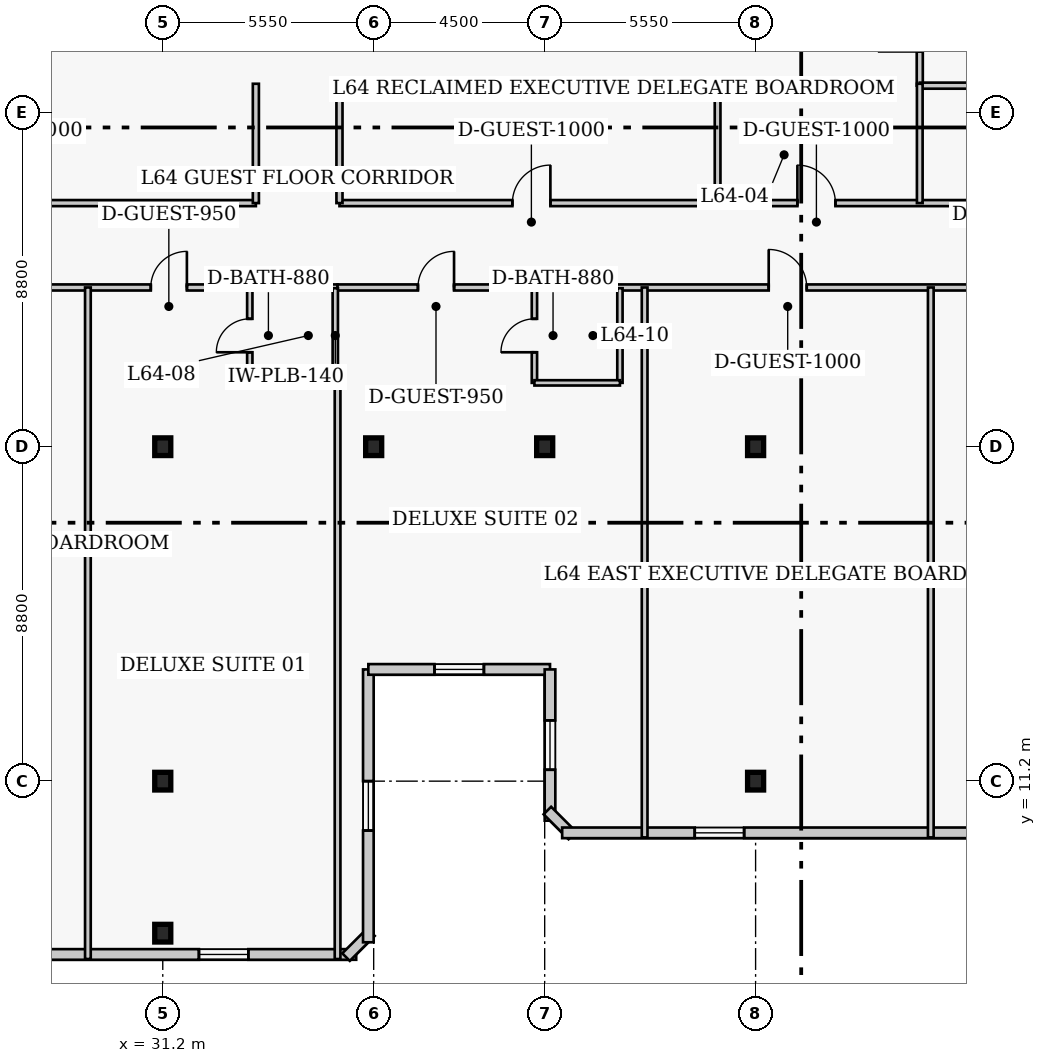
"""IFC4 building model, lengths in metres.
Left out: names, types, materials, properties, quantities, classifications, styles, units other than length and angle.
Written with IfcOpenShell. Run it as: python <this file> out.ifc"""

import sys

from ifc_helpers import new_model, si_unit, direction, frame, frame_2d, origin, origin_2d, place, context, subcontext, project, spatial, rectangle, i_section, extrude, element, fill, save


model = new_model("IFC4")
c1 = context("Model", 3, precision=1e-05, world=origin(), true_north=direction((0.0, 1.0)))
c2 = subcontext(c1, "Body", "Model", "MODEL_VIEW")
j1 = project(units=[si_unit("LENGTHUNIT", "METRE"), si_unit("PLANEANGLEUNIT", "RADIAN")], contexts=[c1])
p1 = place(None, origin())
s1 = spatial("IfcSite", under=j1, at=p1, CompositionType="ELEMENT")
p2 = place(p1, origin())
s2 = spatial("IfcBuilding", under=s1, at=p2, CompositionType="ELEMENT")
p3 = place(p2, frame((0.0, 0.0, 257.4)))
s3 = spatial("IfcBuildingStorey", under=s2, at=p3, CompositionType="ELEMENT", Elevation=257.4)
for number, where, z_axis, x_axis in (
    (1, (31.2, 11.2, 0.0), (0.0, 0.0, 1.0), (1.0, 0.0, 0.0)),
    (2, (31.2, 20.0, 0.0), (0.0, 0.0, 1.0), (1.0, 0.0, 0.0)),
    (3, (36.75, 20.0, 0.0), (0.0, 0.0, 1.0), (1.0, 0.0, 0.0)),
    (4, (41.25, 20.0, 0.0), (0.0, 0.0, 1.0), (1.0, 0.0, 0.0)),
    (5, (46.8, 11.2, 0.0), (0.0, 0.0, 1.0), (1.0, 0.0, 0.0)),
    (6, (46.8, 20.0, 0.0), (0.0, 0.0, 1.0), (1.0, 0.0, 0.0)),
    (7, (31.2, 7.2, 0.0), (0.0, 0.0, 1.0), (1.0, 0.0, 0.0)),
):
    element("IfcColumn", number, at=place(p3, frame(where, z_axis=z_axis, x_axis=x_axis)), inside=s3, PredefinedType="COLUMN", context=c2, shape_type="SweptSolid", body=[
        extrude(i_section(OverallWidth=0.422, OverallDepth=0.465, WebThickness=0.045, FlangeThickness=0.073, FilletRadius=0.017, at=origin_2d()), origin(), (0.0, 0.0, 1.0), 4.0),
    ])
p4 = place(p3, frame((11.46, 6.64, 0.0), z_axis=(0.0, 0.0, 1.0), x_axis=(1.0, 0.0, 0.0)))
e8 = element("IfcWall", 8, at=p4, inside=s3, PredefinedType="SOLIDWALL", context=c2, shape_type="SweptSolid", body=[
    extrude(rectangle(XDim=24.83, YDim=0.28, at=frame_2d((12.415, 0.0))), origin(), (0.0, 0.0, 1.0), 3.76),
])
p5 = place(p4, frame((3.488, 0.0, 0.85)))
e9 = element("IfcOpeningElement", 9, at=p5, cuts=e8, PredefinedType="OPENING", context=c2, shape_type="SweptSolid", body=[
    extrude(rectangle(XDim=1.3, YDim=1.7, at=frame_2d((0.65, 0.85))), frame((0.0, 0.15, 0.0), z_axis=(0.0, -1.0, 0.0), x_axis=(1.0, 0.0, 0.0)), (0.0, 0.0, 1.0), 0.3),
])
p6 = place(p4, frame((12.915, 0.0, 0.85)))
e10 = element("IfcOpeningElement", 10, at=p6, cuts=e8, PredefinedType="OPENING", context=c2, shape_type="SweptSolid", body=[
    extrude(rectangle(XDim=1.3, YDim=1.7, at=frame_2d((0.65, 0.85))), frame((0.0, 0.15, 0.0), z_axis=(0.0, -1.0, 0.0), x_axis=(1.0, 0.0, 0.0)), (0.0, 0.0, 1.0), 0.3),
])
p7 = place(p4, frame((20.692, 0.0, 0.85)))
e11 = element("IfcOpeningElement", 11, at=p7, cuts=e8, PredefinedType="OPENING", context=c2, shape_type="SweptSolid", body=[
    extrude(rectangle(XDim=1.3, YDim=1.7, at=frame_2d((0.65, 0.85))), frame((0.0, 0.15, 0.0), z_axis=(0.0, -1.0, 0.0), x_axis=(1.0, 0.0, 0.0)), (0.0, 0.0, 1.0), 0.3),
])
p8 = place(p3, frame((36.023, 6.571, 0.0), z_axis=(0.0, 0.0, 1.0), x_axis=(0.707106781187, 0.707106781187, 0.0)))
e12 = element("IfcWall", 12, at=p8, inside=s3, PredefinedType="SOLIDWALL", context=c2, shape_type="SweptSolid", body=[
    extrude(rectangle(XDim=0.928, YDim=0.28, at=frame_2d((0.464, 0.0))), origin(), (0.0, 0.0, 1.0), 3.76),
])
p9 = place(p3, frame((36.61, 6.96, 0.0), z_axis=(0.0, 0.0, 1.0), x_axis=(0.0, 1.0, 0.0)))
e13 = element("IfcWall", 13, at=p9, inside=s3, PredefinedType="SOLIDWALL", context=c2, shape_type="SweptSolid", body=[
    extrude(rectangle(XDim=7.18, YDim=0.28, at=frame_2d((3.59, 0.0))), origin(), (0.0, 0.0, 1.0), 3.76),
])
p10 = place(p9, frame((2.94, 0.0, 0.85)))
e14 = element("IfcOpeningElement", 14, at=p10, cuts=e13, PredefinedType="OPENING", context=c2, shape_type="SweptSolid", body=[
    extrude(rectangle(XDim=1.3, YDim=1.7, at=frame_2d((0.65, 0.85))), frame((0.0, 0.15, 0.0), z_axis=(0.0, -1.0, 0.0), x_axis=(1.0, 0.0, 0.0)), (0.0, 0.0, 1.0), 0.3),
])
p11 = place(p3, frame((36.61, 14.14, 0.0), z_axis=(0.0, 0.0, 1.0), x_axis=(1.0, 0.0, 0.0)))
e15 = element("IfcWall", 15, at=p11, inside=s3, PredefinedType="SOLIDWALL", context=c2, shape_type="SweptSolid", body=[
    extrude(rectangle(XDim=4.78, YDim=0.28, at=frame_2d((2.39, 0.0))), origin(), (0.0, 0.0, 1.0), 3.76),
])
p12 = place(p11, frame((1.74, 0.0, 0.85)))
e16 = element("IfcOpeningElement", 16, at=p12, cuts=e15, PredefinedType="OPENING", context=c2, shape_type="SweptSolid", body=[
    extrude(rectangle(XDim=1.3, YDim=1.7, at=frame_2d((0.65, 0.85))), frame((0.0, 0.15, 0.0), z_axis=(0.0, -1.0, 0.0), x_axis=(1.0, 0.0, 0.0)), (0.0, 0.0, 1.0), 0.3),
])
p13 = place(p3, frame((41.39, 14.14, 0.0), z_axis=(0.0, 0.0, 1.0), x_axis=(0.0, -1.0, 0.0)))
e17 = element("IfcWall", 17, at=p13, inside=s3, PredefinedType="SOLIDWALL", context=c2, shape_type="SweptSolid", body=[
    extrude(rectangle(XDim=3.98, YDim=0.28, at=frame_2d((1.99, 0.0))), origin(), (0.0, 0.0, 1.0), 3.76),
])
p14 = place(p13, frame((1.34, 0.0, 0.85)))
e18 = element("IfcOpeningElement", 18, at=p14, cuts=e17, PredefinedType="OPENING", context=c2, shape_type="SweptSolid", body=[
    extrude(rectangle(XDim=1.3, YDim=1.7, at=frame_2d((0.65, 0.85))), frame((0.0, 0.15, 0.0), z_axis=(0.0, -1.0, 0.0), x_axis=(1.0, 0.0, 0.0)), (0.0, 0.0, 1.0), 0.3),
])
p15 = place(p3, frame((41.321, 10.427, 0.0), z_axis=(0.0, 0.0, 1.0), x_axis=(0.707106781187, -0.707106781187, 0.0)))
e19 = element("IfcWall", 19, at=p15, inside=s3, PredefinedType="SOLIDWALL", context=c2, shape_type="SweptSolid", body=[
    extrude(rectangle(XDim=0.928, YDim=0.28, at=frame_2d((0.464, 0.0))), origin(), (0.0, 0.0, 1.0), 3.76),
])
p16 = place(p3, frame((41.71, 9.84, 0.0), z_axis=(0.0, 0.0, 1.0), x_axis=(1.0, 0.0, 0.0)))
e20 = element("IfcWall", 20, at=p16, inside=s3, PredefinedType="SOLIDWALL", context=c2, shape_type="SweptSolid", body=[
    extrude(rectangle(XDim=24.83, YDim=0.28, at=frame_2d((12.415, 0.0))), origin(), (0.0, 0.0, 1.0), 3.76),
])
p17 = place(p16, frame((3.488, 0.0, 0.85)))
e21 = element("IfcOpeningElement", 21, at=p17, cuts=e20, PredefinedType="OPENING", context=c2, shape_type="SweptSolid", body=[
    extrude(rectangle(XDim=1.3, YDim=1.7, at=frame_2d((0.65, 0.85))), frame((0.0, 0.15, 0.0), z_axis=(0.0, -1.0, 0.0), x_axis=(1.0, 0.0, 0.0)), (0.0, 0.0, 1.0), 0.3),
])
p18 = place(p16, frame((11.115, 0.0, 0.85)))
e22 = element("IfcOpeningElement", 22, at=p18, cuts=e20, PredefinedType="OPENING", context=c2, shape_type="SweptSolid", body=[
    extrude(rectangle(XDim=1.3, YDim=1.7, at=frame_2d((0.65, 0.85))), frame((0.0, 0.15, 0.0), z_axis=(0.0, -1.0, 0.0), x_axis=(1.0, 0.0, 0.0)), (0.0, 0.0, 1.0), 0.3),
])
p19 = place(p16, frame((18.892, 0.0, 0.85)))
e23 = element("IfcOpeningElement", 23, at=p19, cuts=e20, PredefinedType="OPENING", context=c2, shape_type="SweptSolid", body=[
    extrude(rectangle(XDim=1.3, YDim=1.7, at=frame_2d((0.65, 0.85))), frame((0.0, 0.15, 0.0), z_axis=(0.0, -1.0, 0.0), x_axis=(1.0, 0.0, 0.0)), (0.0, 0.0, 1.0), 0.3),
])
p20 = place(p3, frame((51.12, 29.5, 0.0), z_axis=(0.0, 0.0, 1.0), x_axis=(0.0, 1.0, 0.0)))
e24 = element("IfcWall", 24, at=p20, inside=s3, PredefinedType="PARTITIONING", context=c2, shape_type="SweptSolid", body=[
    extrude(rectangle(XDim=3.7, YDim=0.16, at=frame_2d((1.85, 0.0))), origin(), (0.0, 0.0, 1.0), 3.76),
])
p21 = place(p20, frame((0.9, 0.0, 0.0)))
e25 = element("IfcOpeningElement", 25, at=p21, cuts=e24, PredefinedType="OPENING", context=c2, shape_type="SweptSolid", body=[
    extrude(rectangle(XDim=1.1, YDim=2.15, at=frame_2d((0.55, 1.075))), frame((0.0, 0.09, 0.0), z_axis=(0.0, -1.0, 0.0), x_axis=(1.0, 0.0, 0.0)), (0.0, 0.0, 1.0), 0.18),
])
p22 = place(p3, frame((51.12, 29.5, 0.0), z_axis=(0.0, 0.0, 1.0), x_axis=(1.0, 0.0, 0.0)))
e26 = element("IfcWall", 26, at=p22, inside=s3, PredefinedType="PARTITIONING", context=c2, shape_type="SweptSolid", body=[
    extrude(rectangle(XDim=5.63, YDim=0.16, at=frame_2d((2.815, 0.0))), origin(), (0.0, 0.0, 1.0), 3.76),
])
p23 = place(p3, frame((20.4, 26.41, 0.0), z_axis=(0.0, 0.0, 1.0), x_axis=(1.0, 0.0, 0.0)))
e27 = element("IfcWall", 27, at=p23, inside=s3, PredefinedType="PARTITIONING", context=c2, shape_type="SweptSolid", body=[
    extrude(rectangle(XDim=13.25, YDim=0.16, at=frame_2d((6.625, 0.0))), origin(), (0.0, 0.0, 1.0), 3.76),
])
p24 = place(p23, frame((6.25, 0.0, 0.0)))
e28 = element("IfcOpeningElement", 28, at=p24, cuts=e27, PredefinedType="OPENING", context=c2, shape_type="SweptSolid", body=[
    extrude(rectangle(XDim=1.0, YDim=2.15, at=frame_2d((0.5, 1.075))), frame((0.0, 0.09, 0.0), z_axis=(0.0, -1.0, 0.0), x_axis=(1.0, 0.0, 0.0)), (0.0, 0.0, 1.0), 0.18),
])
p25 = place(p3, frame((35.85, 26.41, 0.0), z_axis=(0.0, 0.0, 1.0), x_axis=(1.0, 0.0, 0.0)))
e29 = element("IfcWall", 29, at=p25, inside=s3, PredefinedType="PARTITIONING", context=c2, shape_type="SweptSolid", body=[
    extrude(rectangle(XDim=22.6, YDim=0.16, at=frame_2d((11.3, 0.0))), origin(), (0.0, 0.0, 1.0), 3.76),
])
p26 = place(p25, frame((4.55, 0.0, 0.0)))
e30 = element("IfcOpeningElement", 30, at=p26, cuts=e29, PredefinedType="OPENING", context=c2, shape_type="SweptSolid", body=[
    extrude(rectangle(XDim=1.0, YDim=2.15, at=frame_2d((0.5, 1.075))), frame((0.0, 0.09, 0.0), z_axis=(0.0, -1.0, 0.0), x_axis=(1.0, 0.0, 0.0)), (0.0, 0.0, 1.0), 0.18),
])
p27 = place(p25, frame((12.05, 0.0, 0.0)))
e31 = element("IfcOpeningElement", 31, at=p27, cuts=e29, PredefinedType="OPENING", context=c2, shape_type="SweptSolid", body=[
    extrude(rectangle(XDim=1.0, YDim=2.15, at=frame_2d((0.5, 1.075))), frame((0.0, 0.09, 0.0), z_axis=(0.0, -1.0, 0.0), x_axis=(1.0, 0.0, 0.0)), (0.0, 0.0, 1.0), 0.18),
])
for number, where, z_axis, x_axis in (
    (32, (33.65, 26.41, 0.0), (0.0, 0.0, 1.0), (0.0, 1.0, 0.0)),
    (33, (35.85, 26.41, 0.0), (0.0, 0.0, 1.0), (0.0, 1.0, 0.0)),
):
    element("IfcWall", number, at=place(p3, frame(where, z_axis=z_axis, x_axis=x_axis)), inside=s3, PredefinedType="PARTITIONING", context=c2, shape_type="SweptSolid", body=[
        extrude(rectangle(XDim=3.14, YDim=0.16, at=frame_2d((1.57, 0.0))), origin(), (0.0, 0.0, 1.0), 3.76),
    ])
p28 = place(p3, frame((20.4, 24.19, 0.0), z_axis=(0.0, 0.0, 1.0), x_axis=(1.0, 0.0, 0.0)))
e34 = element("IfcWall", 34, at=p28, inside=s3, PredefinedType="PARTITIONING", context=c2, shape_type="SweptSolid", body=[
    extrude(rectangle(XDim=15.4, YDim=0.16, at=frame_2d((7.7, 0.0))), origin(), (0.0, 0.0, 1.0), 3.76),
])
p29 = place(p28, frame((3.945, 0.0, 0.0)))
e35 = element("IfcOpeningElement", 35, at=p29, cuts=e34, PredefinedType="OPENING", context=c2, shape_type="SweptSolid", body=[
    extrude(rectangle(XDim=1.0, YDim=2.15, at=frame_2d((0.5, 1.075))), frame((0.0, 0.09, 0.0), z_axis=(0.0, -1.0, 0.0), x_axis=(1.0, 0.0, 0.0)), (0.0, 0.0, 1.0), 0.18),
])
p30 = place(p28, frame((10.485, 0.0, 0.0)))
e36 = element("IfcOpeningElement", 36, at=p30, cuts=e34, PredefinedType="OPENING", context=c2, shape_type="SweptSolid", body=[
    extrude(rectangle(XDim=0.95, YDim=2.1, at=frame_2d((0.475, 1.05))), frame((0.0, 0.09, 0.0), z_axis=(0.0, -1.0, 0.0), x_axis=(1.0, 0.0, 0.0)), (0.0, 0.0, 1.0), 0.18),
])
p31 = place(p3, frame((35.8, 24.19, 0.0), z_axis=(0.0, 0.0, 1.0), x_axis=(1.0, 0.0, 0.0)))
e37 = element("IfcWall", 37, at=p31, inside=s3, PredefinedType="PARTITIONING", context=c2, shape_type="SweptSolid", body=[
    extrude(rectangle(XDim=24.81, YDim=0.16, at=frame_2d((12.405, 0.0))), origin(), (0.0, 0.0, 1.0), 3.76),
])
p32 = place(p31, frame((2.115, 0.0, 0.0)))
e38 = element("IfcOpeningElement", 38, at=p32, cuts=e37, PredefinedType="OPENING", context=c2, shape_type="SweptSolid", body=[
    extrude(rectangle(XDim=0.95, YDim=2.1, at=frame_2d((0.475, 1.05))), frame((0.0, 0.09, 0.0), z_axis=(0.0, -1.0, 0.0), x_axis=(1.0, 0.0, 0.0)), (0.0, 0.0, 1.0), 0.18),
])
p33 = place(p31, frame((11.345, 0.0, 0.0)))
e39 = element("IfcOpeningElement", 39, at=p33, cuts=e37, PredefinedType="OPENING", context=c2, shape_type="SweptSolid", body=[
    extrude(rectangle(XDim=1.0, YDim=2.15, at=frame_2d((0.5, 1.075))), frame((0.0, 0.09, 0.0), z_axis=(0.0, -1.0, 0.0), x_axis=(1.0, 0.0, 0.0)), (0.0, 0.0, 1.0), 0.18),
])
p34 = place(p31, frame((17.47, 0.0, 0.0)))
e40 = element("IfcOpeningElement", 40, at=p34, cuts=e37, PredefinedType="OPENING", context=c2, shape_type="SweptSolid", body=[
    extrude(rectangle(XDim=0.95, YDim=2.1, at=frame_2d((0.475, 1.05))), frame((0.0, 0.09, 0.0), z_axis=(0.0, -1.0, 0.0), x_axis=(1.0, 0.0, 0.0)), (0.0, 0.0, 1.0), 0.18),
])
p35 = place(p31, frame((23.265, 0.0, 0.0)))
e41 = element("IfcOpeningElement", 41, at=p35, cuts=e37, PredefinedType="OPENING", context=c2, shape_type="SweptSolid", body=[
    extrude(rectangle(XDim=0.95, YDim=2.1, at=frame_2d((0.475, 1.05))), frame((0.0, 0.09, 0.0), z_axis=(0.0, -1.0, 0.0), x_axis=(1.0, 0.0, 0.0)), (0.0, 0.0, 1.0), 0.18),
])
for number, where, z_axis, x_axis in (
    (42, (45.8, 26.41, 0.0), (0.0, 0.0, 1.0), (0.0, 1.0, 0.0)),
    (43, (51.12, 26.41, 0.0), (0.0, 0.0, 1.0), (0.0, 1.0, 0.0)),
):
    element("IfcWall", number, at=place(p3, frame(where, z_axis=z_axis, x_axis=x_axis)), inside=s3, PredefinedType="PARTITIONING", context=c2, shape_type="SweptSolid", body=[
        extrude(rectangle(XDim=3.14, YDim=0.15, at=frame_2d((1.57, 0.0))), origin(), (0.0, 0.0, 1.0), 3.76),
    ])
p36 = place(p3, frame((29.23, 6.52, 0.0), z_axis=(0.0, 0.0, 1.0), x_axis=(0.0, 1.0, 0.0)))
e44 = element("IfcWall", 44, at=p36, inside=s3, PredefinedType="PARTITIONING", context=c2, shape_type="SweptSolid", body=[
    extrude(rectangle(XDim=17.67, YDim=0.15, at=frame_2d((8.835, 0.0))), origin(), (0.0, 0.0, 1.0), 3.76),
])
p37 = place(p3, frame((33.49, 21.68, 0.0), z_axis=(0.0, 0.0, 1.0), x_axis=(0.0, 1.0, 0.0)))
e45 = element("IfcWall", 45, at=p37, inside=s3, PredefinedType="PLUMBINGWALL", context=c2, shape_type="SweptSolid", body=[
    extrude(rectangle(XDim=2.49, YDim=0.14, at=frame_2d((1.245, 0.0))), origin(), (0.0, 0.0, 1.0), 3.76),
])
p38 = place(p37, frame((0.805, 0.0, 0.0)))
e46 = element("IfcOpeningElement", 46, at=p38, cuts=e45, PredefinedType="OPENING", context=c2, shape_type="SweptSolid", body=[
    extrude(rectangle(XDim=0.88, YDim=2.05, at=frame_2d((0.44, 1.025))), frame((0.0, 0.08, 0.0), z_axis=(0.0, -1.0, 0.0), x_axis=(1.0, 0.0, 0.0)), (0.0, 0.0, 1.0), 0.16),
])
p39 = place(p3, frame((35.74, 21.68, 0.0), z_axis=(0.0, 0.0, 1.0), x_axis=(0.0, 1.0, 0.0)))
e47 = element("IfcWall", 47, at=p39, inside=s3, PredefinedType="PLUMBINGWALL", context=c2, shape_type="SweptSolid", body=[
    extrude(rectangle(XDim=2.49, YDim=0.14, at=frame_2d((1.245, 0.0))), origin(), (0.0, 0.0, 1.0), 3.76),
])
p40 = place(p3, frame((33.49, 21.68, 0.0), z_axis=(0.0, 0.0, 1.0), x_axis=(1.0, 0.0, 0.0)))
e48 = element("IfcWall", 48, at=p40, inside=s3, PredefinedType="PLUMBINGWALL", context=c2, shape_type="SweptSolid", body=[
    extrude(rectangle(XDim=2.25, YDim=0.14, at=frame_2d((1.125, 0.0))), origin(), (0.0, 0.0, 1.0), 3.76),
])
p41 = place(p3, frame((35.8, 6.52, 0.0), z_axis=(0.0, 0.0, 1.0), x_axis=(0.0, 1.0, 0.0)))
e49 = element("IfcWall", 49, at=p41, inside=s3, PredefinedType="PARTITIONING", context=c2, shape_type="SweptSolid", body=[
    extrude(rectangle(XDim=15.16, YDim=0.15, at=frame_2d((7.58, 0.0))), origin(), (0.0, 0.0, 1.0), 3.76),
])
p42 = place(p3, frame((40.98, 21.68, 0.0), z_axis=(0.0, 0.0, 1.0), x_axis=(0.0, 1.0, 0.0)))
e50 = element("IfcWall", 50, at=p42, inside=s3, PredefinedType="PLUMBINGWALL", context=c2, shape_type="SweptSolid", body=[
    extrude(rectangle(XDim=2.49, YDim=0.14, at=frame_2d((1.245, 0.0))), origin(), (0.0, 0.0, 1.0), 3.76),
])
p43 = place(p42, frame((0.805, 0.0, 0.0)))
e51 = element("IfcOpeningElement", 51, at=p43, cuts=e50, PredefinedType="OPENING", context=c2, shape_type="SweptSolid", body=[
    extrude(rectangle(XDim=0.88, YDim=2.05, at=frame_2d((0.44, 1.025))), frame((0.0, 0.08, 0.0), z_axis=(0.0, -1.0, 0.0), x_axis=(1.0, 0.0, 0.0)), (0.0, 0.0, 1.0), 0.16),
])
p44 = place(p3, frame((43.23, 21.68, 0.0), z_axis=(0.0, 0.0, 1.0), x_axis=(0.0, 1.0, 0.0)))
e52 = element("IfcWall", 52, at=p44, inside=s3, PredefinedType="PLUMBINGWALL", context=c2, shape_type="SweptSolid", body=[
    extrude(rectangle(XDim=2.49, YDim=0.14, at=frame_2d((1.245, 0.0))), origin(), (0.0, 0.0, 1.0), 3.76),
])
p45 = place(p3, frame((40.98, 21.68, 0.0), z_axis=(0.0, 0.0, 1.0), x_axis=(1.0, 0.0, 0.0)))
e53 = element("IfcWall", 53, at=p45, inside=s3, PredefinedType="PLUMBINGWALL", context=c2, shape_type="SweptSolid", body=[
    extrude(rectangle(XDim=2.25, YDim=0.14, at=frame_2d((1.125, 0.0))), origin(), (0.0, 0.0, 1.0), 3.76),
])
for number, where, z_axis, x_axis in (
    (54, (43.88, 9.72, 0.0), (0.0, 0.0, 1.0), (0.0, 1.0, 0.0)),
    (55, (51.41, 9.72, 0.0), (0.0, 0.0, 1.0), (0.0, 1.0, 0.0)),
):
    element("IfcWall", number, at=place(p3, frame(where, z_axis=z_axis, x_axis=x_axis)), inside=s3, PredefinedType="PARTITIONING", context=c2, shape_type="SweptSolid", body=[
        extrude(rectangle(XDim=14.47, YDim=0.15, at=frame_2d((7.235, 0.0))), origin(), (0.0, 0.0, 1.0), 3.76),
    ])
p46 = place(p7, origin())
e56 = element("IfcWindow", 56, at=p46, inside=s3, PartitioningType="SINGLE_PANEL", PredefinedType="WINDOW", context=c2, shape_type="SweptSolid", body=[
    extrude(rectangle(XDim=1.3, YDim=1.7, at=frame_2d((0.65, 0.85))), frame((0.0, 0.03, 0.0), z_axis=(0.0, -1.0, 0.0), x_axis=(1.0, 0.0, 0.0)), (0.0, 0.0, 1.0), 0.06),
])
fill(e11, e56)
p47 = place(p10, origin())
e57 = element("IfcWindow", 57, at=p47, inside=s3, PartitioningType="SINGLE_PANEL", PredefinedType="WINDOW", context=c2, shape_type="SweptSolid", body=[
    extrude(rectangle(XDim=1.3, YDim=1.7, at=frame_2d((0.65, 0.85))), frame((0.0, 0.03, 0.0), z_axis=(0.0, -1.0, 0.0), x_axis=(1.0, 0.0, 0.0)), (0.0, 0.0, 1.0), 0.06),
])
fill(e14, e57)
p48 = place(p12, origin())
e58 = element("IfcWindow", 58, at=p48, inside=s3, PartitioningType="SINGLE_PANEL", PredefinedType="WINDOW", context=c2, shape_type="SweptSolid", body=[
    extrude(rectangle(XDim=1.3, YDim=1.7, at=frame_2d((0.65, 0.85))), frame((0.0, 0.03, 0.0), z_axis=(0.0, -1.0, 0.0), x_axis=(1.0, 0.0, 0.0)), (0.0, 0.0, 1.0), 0.06),
])
fill(e16, e58)
p49 = place(p14, origin())
e59 = element("IfcWindow", 59, at=p49, inside=s3, PartitioningType="SINGLE_PANEL", PredefinedType="WINDOW", context=c2, shape_type="SweptSolid", body=[
    extrude(rectangle(XDim=1.3, YDim=1.7, at=frame_2d((0.65, 0.85))), frame((0.0, 0.03, 0.0), z_axis=(0.0, -1.0, 0.0), x_axis=(1.0, 0.0, 0.0)), (0.0, 0.0, 1.0), 0.06),
])
fill(e18, e59)
p50 = place(p17, origin())
e60 = element("IfcWindow", 60, at=p50, inside=s3, PartitioningType="SINGLE_PANEL", PredefinedType="WINDOW", context=c2, shape_type="SweptSolid", body=[
    extrude(rectangle(XDim=1.3, YDim=1.7, at=frame_2d((0.65, 0.85))), frame((0.0, 0.03, 0.0), z_axis=(0.0, -1.0, 0.0), x_axis=(1.0, 0.0, 0.0)), (0.0, 0.0, 1.0), 0.06),
])
fill(e21, e60)
p51 = place(p26, origin())
e61 = element("IfcDoor", 61, at=p51, inside=s3, OperationType="SINGLE_SWING_RIGHT", PredefinedType="DOOR", context=c2, shape_type="SweptSolid", body=[
    extrude(rectangle(XDim=1.0, YDim=2.15, at=frame_2d((0.5, 1.075))), frame((0.0, 0.025, 0.0), z_axis=(0.0, -1.0, 0.0), x_axis=(1.0, 0.0, 0.0)), (0.0, 0.0, 1.0), 0.05),
])
fill(e30, e61)
p52 = place(p27, origin())
e62 = element("IfcDoor", 62, at=p52, inside=s3, OperationType="SINGLE_SWING_LEFT", PredefinedType="DOOR", context=c2, shape_type="SweptSolid", body=[
    extrude(rectangle(XDim=1.0, YDim=2.15, at=frame_2d((0.5, 1.075))), frame((0.0, 0.025, 0.0), z_axis=(0.0, -1.0, 0.0), x_axis=(1.0, 0.0, 0.0)), (0.0, 0.0, 1.0), 0.05),
])
fill(e31, e62)
p53 = place(p38, origin())
e63 = element("IfcDoor", 63, at=p53, inside=s3, OperationType="SINGLE_SWING_LEFT", PredefinedType="DOOR", context=c2, shape_type="SweptSolid", body=[
    extrude(rectangle(XDim=0.88, YDim=2.05, at=frame_2d((0.44, 1.025))), frame((0.0, 0.025, 0.0), z_axis=(0.0, -1.0, 0.0), x_axis=(1.0, 0.0, 0.0)), (0.0, 0.0, 1.0), 0.05),
])
fill(e46, e63)
p54 = place(p30, origin())
e64 = element("IfcDoor", 64, at=p54, inside=s3, OperationType="SINGLE_SWING_RIGHT", PredefinedType="DOOR", context=c2, shape_type="SweptSolid", body=[
    extrude(rectangle(XDim=0.95, YDim=2.1, at=frame_2d((0.475, 1.05))), frame((0.0, 0.025, 0.0), z_axis=(0.0, -1.0, 0.0), x_axis=(1.0, 0.0, 0.0)), (0.0, 0.0, 1.0), 0.05),
])
fill(e36, e64)
p55 = place(p43, origin())
e65 = element("IfcDoor", 65, at=p55, inside=s3, OperationType="SINGLE_SWING_LEFT", PredefinedType="DOOR", context=c2, shape_type="SweptSolid", body=[
    extrude(rectangle(XDim=0.88, YDim=2.05, at=frame_2d((0.44, 1.025))), frame((0.0, 0.025, 0.0), z_axis=(0.0, -1.0, 0.0), x_axis=(1.0, 0.0, 0.0)), (0.0, 0.0, 1.0), 0.05),
])
fill(e51, e65)
p56 = place(p32, origin())
e66 = element("IfcDoor", 66, at=p56, inside=s3, OperationType="SINGLE_SWING_RIGHT", PredefinedType="DOOR", context=c2, shape_type="SweptSolid", body=[
    extrude(rectangle(XDim=0.95, YDim=2.1, at=frame_2d((0.475, 1.05))), frame((0.0, 0.025, 0.0), z_axis=(0.0, -1.0, 0.0), x_axis=(1.0, 0.0, 0.0)), (0.0, 0.0, 1.0), 0.05),
])
fill(e38, e66)
p57 = place(p33, origin())
e67 = element("IfcDoor", 67, at=p57, inside=s3, OperationType="SINGLE_SWING_LEFT", PredefinedType="DOOR", context=c2, shape_type="SweptSolid", body=[
    extrude(rectangle(XDim=1.0, YDim=2.15, at=frame_2d((0.5, 1.075))), frame((0.0, 0.025, 0.0), z_axis=(0.0, -1.0, 0.0), x_axis=(1.0, 0.0, 0.0)), (0.0, 0.0, 1.0), 0.05),
])
fill(e39, e67)
save(model, sys.argv[1])
